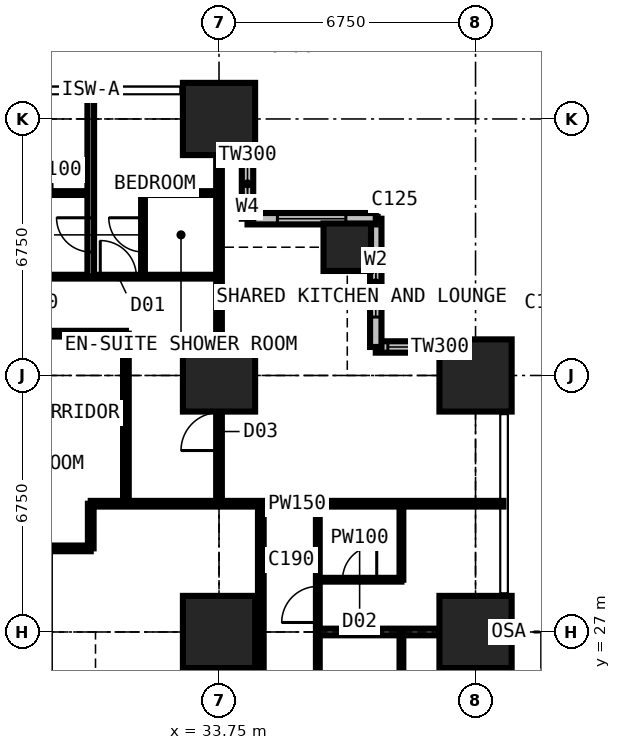
"""IFC4 building model, lengths in metres.
Left out: names, types, materials, properties, quantities, classifications, styles, units other than length and angle.
Written with IfcOpenShell. Run it as: python <this file> out.ifc"""

import sys

from ifc_helpers import new_model, si_unit, direction, frame, frame_2d, origin, origin_2d, place, context, subcontext, project, spatial, rectangle, extrude, element, fill, save


model = new_model("IFC4")
c1 = context("Model", 3, precision=1e-05, world=origin(), true_north=direction((0.0, 1.0)))
c2 = subcontext(c1, "Body", "Model", "MODEL_VIEW")
j1 = project(units=[si_unit("LENGTHUNIT", "METRE"), si_unit("PLANEANGLEUNIT", "RADIAN")], contexts=[c1])
p1 = place(None, origin())
s1 = spatial("IfcSite", under=j1, at=p1, CompositionType="ELEMENT")
p2 = place(p1, origin())
s2 = spatial("IfcBuilding", under=s1, at=p2, CompositionType="ELEMENT")
p3 = place(p2, frame((0.0, 0.0, 32.4)))
s3 = spatial("IfcBuildingStorey", under=s2, at=p3, CompositionType="ELEMENT", Elevation=32.4)
for number, where, z_axis, x_axis in (
    (1, (33.75, 27.0, 0.0), (0.0, 0.0, 1.0), (1.0, 0.0, 0.0)),
    (2, (33.75, 33.75, 0.0), (0.0, 0.0, 1.0), (1.0, 0.0, 0.0)),
    (3, (33.75, 40.5, 0.0), (0.0, 0.0, 1.0), (1.0, 0.0, 0.0)),
):
    element("IfcColumn", number, at=place(p3, frame(where, z_axis=z_axis, x_axis=x_axis)), inside=s3, PredefinedType="COLUMN", context=c2, shape_type="SweptSolid", body=[
        extrude(rectangle(XDim=1.9, YDim=1.9, at=origin_2d()), origin(), (0.0, 0.0, 1.0), 3.6),
    ])
p4 = place(p3, frame((37.125, 37.125, 0.0), z_axis=(0.0, 0.0, 1.0), x_axis=(1.0, 0.0, 0.0)))
e4 = element("IfcColumn", 4, at=p4, inside=s3, PredefinedType="COLUMN", context=c2, shape_type="SweptSolid", body=[
    extrude(rectangle(XDim=1.25, YDim=1.25, at=origin_2d()), origin(), (0.0, 0.0, 1.0), 3.6),
])
for number, where, z_axis, x_axis in (
    (5, (40.5, 27.0, 0.0), (0.0, 0.0, 1.0), (1.0, 0.0, 0.0)),
    (6, (40.5, 33.75, 0.0), (0.0, 0.0, 1.0), (1.0, 0.0, 0.0)),
):
    element("IfcColumn", number, at=place(p3, frame(where, z_axis=z_axis, x_axis=x_axis)), inside=s3, PredefinedType="COLUMN", context=c2, shape_type="SweptSolid", body=[
        extrude(rectangle(XDim=1.9, YDim=1.9, at=origin_2d()), origin(), (0.0, 0.0, 1.0), 3.6),
    ])
p5 = place(p3, frame((41.25, 34.5, 0.0), z_axis=(0.0, 0.0, 1.0), x_axis=(-1.0, 0.0, 0.0)))
e7 = element("IfcWall", 7, at=p5, inside=s3, PredefinedType="SOLIDWALL", context=c2, shape_type="SweptSolid", body=[
    extrude(rectangle(XDim=3.375, YDim=0.3, at=frame_2d((1.688, 0.0))), origin(), (0.0, 0.0, 1.0), 3.375),
])
p6 = place(p5, frame((1.857, 0.0, 0.9)))
e8 = element("IfcOpeningElement", 8, at=p6, cuts=e7, PredefinedType="OPENING", context=c2, shape_type="SweptSolid", body=[
    extrude(rectangle(XDim=1.2, YDim=1.8, at=frame_2d((0.6, 0.9))), frame((0.0, 0.16, 0.0), z_axis=(0.0, -1.0, 0.0), x_axis=(1.0, 0.0, 0.0)), (0.0, 0.0, 1.0), 0.32),
])
p7 = place(p3, frame((37.875, 34.5, 0.0), z_axis=(0.0, 0.0, 1.0), x_axis=(0.0, 1.0, 0.0)))
e9 = element("IfcWall", 9, at=p7, inside=s3, PredefinedType="SOLIDWALL", context=c2, shape_type="SweptSolid", body=[
    extrude(rectangle(XDim=3.375, YDim=0.3, at=frame_2d((1.688, 0.0))), origin(), (0.0, 0.0, 1.0), 3.375),
])
p8 = place(p7, frame((0.788, 0.0, 0.6)))
e10 = element("IfcOpeningElement", 10, at=p8, cuts=e9, PredefinedType="OPENING", context=c2, shape_type="SweptSolid", body=[
    extrude(rectangle(XDim=1.8, YDim=2.1, at=frame_2d((0.9, 1.05))), frame((0.0, 0.16, 0.0), z_axis=(0.0, -1.0, 0.0), x_axis=(1.0, 0.0, 0.0)), (0.0, 0.0, 1.0), 0.32),
])
p9 = place(p3, frame((37.875, 37.875, 0.0), z_axis=(0.0, 0.0, 1.0), x_axis=(-1.0, 0.0, 0.0)))
e11 = element("IfcWall", 11, at=p9, inside=s3, PredefinedType="SOLIDWALL", context=c2, shape_type="SweptSolid", body=[
    extrude(rectangle(XDim=3.375, YDim=0.3, at=frame_2d((1.688, 0.0))), origin(), (0.0, 0.0, 1.0), 3.375),
])
p10 = place(p9, frame((0.788, 0.0, 0.6)))
e12 = element("IfcOpeningElement", 12, at=p10, cuts=e11, PredefinedType="OPENING", context=c2, shape_type="SweptSolid", body=[
    extrude(rectangle(XDim=1.8, YDim=2.1, at=frame_2d((0.9, 1.05))), frame((0.0, 0.16, 0.0), z_axis=(0.0, -1.0, 0.0), x_axis=(1.0, 0.0, 0.0)), (0.0, 0.0, 1.0), 0.32),
])
p11 = place(p3, frame((34.5, 37.875, 0.0), z_axis=(0.0, 0.0, 1.0), x_axis=(0.0, 1.0, 0.0)))
e13 = element("IfcWall", 13, at=p11, inside=s3, PredefinedType="SOLIDWALL", context=c2, shape_type="SweptSolid", body=[
    extrude(rectangle(XDim=3.375, YDim=0.3, at=frame_2d((1.688, 0.0))), origin(), (0.0, 0.0, 1.0), 3.375),
])
p12 = place(p11, frame((0.317, 0.0, 0.9)))
e14 = element("IfcOpeningElement", 14, at=p12, cuts=e13, PredefinedType="OPENING", context=c2, shape_type="SweptSolid", body=[
    extrude(rectangle(XDim=1.2, YDim=1.8, at=frame_2d((0.6, 0.9))), frame((0.0, 0.16, 0.0), z_axis=(0.0, -1.0, 0.0), x_axis=(1.0, 0.0, 0.0)), (0.0, 0.0, 1.0), 0.32),
])
p13 = place(p3, frame((10.125, 36.35, 0.0), z_axis=(0.0, 0.0, 1.0), x_axis=(1.0, 0.0, 0.0)))
e15 = element("IfcWall", 15, at=p13, inside=s3, PredefinedType="PARTITIONING", context=c2, shape_type="SweptSolid", body=[
    extrude(rectangle(XDim=23.625, YDim=0.1, at=frame_2d((11.812, 0.0))), origin(), (0.0, 0.0, 1.0), 3.375),
])
p14 = place(p13, frame((20.5, 0.0, 0.0)))
e16 = element("IfcOpeningElement", 16, at=p14, cuts=e15, PredefinedType="OPENING", context=c2, shape_type="SweptSolid", body=[
    extrude(rectangle(XDim=0.95, YDim=2.2, at=frame_2d((0.475, 1.1))), frame((0.0, 0.06, 0.0), z_axis=(0.0, -1.0, 0.0), x_axis=(1.0, 0.0, 0.0)), (0.0, 0.0, 1.0), 0.12),
])
p15 = place(p13, frame((17.125, 0.0, 0.0)))
e17 = element("IfcOpeningElement", 17, at=p15, cuts=e15, PredefinedType="OPENING", context=c2, shape_type="SweptSolid", body=[
    extrude(rectangle(XDim=0.95, YDim=2.2, at=frame_2d((0.475, 1.1))), frame((0.0, 0.06, 0.0), z_axis=(0.0, -1.0, 0.0), x_axis=(1.0, 0.0, 0.0)), (0.0, 0.0, 1.0), 0.12),
])
p16 = place(p13, frame((13.7, 0.0, 0.0)))
e18 = element("IfcOpeningElement", 18, at=p16, cuts=e15, PredefinedType="OPENING", context=c2, shape_type="SweptSolid", body=[
    extrude(rectangle(XDim=0.95, YDim=2.2, at=frame_2d((0.475, 1.1))), frame((0.0, 0.06, 0.0), z_axis=(0.0, -1.0, 0.0), x_axis=(1.0, 0.0, 0.0)), (0.0, 0.0, 1.0), 0.12),
])
p17 = place(p13, frame((0.2, 0.0, 0.0)))
e19 = element("IfcOpeningElement", 19, at=p17, cuts=e15, PredefinedType="OPENING", context=c2, shape_type="SweptSolid", body=[
    extrude(rectangle(XDim=0.95, YDim=2.2, at=frame_2d((0.475, 1.1))), frame((0.0, 0.06, 0.0), z_axis=(0.0, -1.0, 0.0), x_axis=(1.0, 0.0, 0.0)), (0.0, 0.0, 1.0), 0.12),
])
p18 = place(p13, frame((3.625, 0.0, 0.0)))
e20 = element("IfcOpeningElement", 20, at=p18, cuts=e15, PredefinedType="OPENING", context=c2, shape_type="SweptSolid", body=[
    extrude(rectangle(XDim=0.95, YDim=2.2, at=frame_2d((0.475, 1.1))), frame((0.0, 0.06, 0.0), z_axis=(0.0, -1.0, 0.0), x_axis=(1.0, 0.0, 0.0)), (0.0, 0.0, 1.0), 0.12),
])
p19 = place(p13, frame((7.0, 0.0, 0.0)))
e21 = element("IfcOpeningElement", 21, at=p19, cuts=e15, PredefinedType="OPENING", context=c2, shape_type="SweptSolid", body=[
    extrude(rectangle(XDim=0.95, YDim=2.2, at=frame_2d((0.475, 1.1))), frame((0.0, 0.06, 0.0), z_axis=(0.0, -1.0, 0.0), x_axis=(1.0, 0.0, 0.0)), (0.0, 0.0, 1.0), 0.12),
])
p20 = place(p13, frame((10.375, 0.0, 0.0)))
e22 = element("IfcOpeningElement", 22, at=p20, cuts=e15, PredefinedType="OPENING", context=c2, shape_type="SweptSolid", body=[
    extrude(rectangle(XDim=0.95, YDim=2.2, at=frame_2d((0.475, 1.1))), frame((0.0, 0.06, 0.0), z_axis=(0.0, -1.0, 0.0), x_axis=(1.0, 0.0, 0.0)), (0.0, 0.0, 1.0), 0.12),
])
p21 = place(p3, frame((11.3, 29.2, 0.0), z_axis=(0.0, 0.0, 1.0), x_axis=(1.0, 0.0, 0.0)))
e23 = element("IfcWall", 23, at=p21, inside=s3, PredefinedType="PARTITIONING", context=c2, shape_type="SweptSolid", body=[
    extrude(rectangle(XDim=19.075, YDim=0.15, at=frame_2d((9.538, 0.0))), origin(), (0.0, 0.0, 1.0), 3.375),
])
p22 = place(p21, frame((12.875, 0.0, 0.0)))
e24 = element("IfcOpeningElement", 24, at=p22, cuts=e23, PredefinedType="OPENING", context=c2, shape_type="SweptSolid", body=[
    extrude(rectangle(XDim=1.0, YDim=2.2, at=frame_2d((0.5, 1.1))), frame((0.0, 0.085, 0.0), z_axis=(0.0, -1.0, 0.0), x_axis=(1.0, 0.0, 0.0)), (0.0, 0.0, 1.0), 0.17),
])
p23 = place(p21, frame((10.438, 0.0, 0.0)))
e25 = element("IfcOpeningElement", 25, at=p23, cuts=e23, PredefinedType="OPENING", context=c2, shape_type="SweptSolid", body=[
    extrude(rectangle(XDim=1.0, YDim=2.2, at=frame_2d((0.5, 1.1))), frame((0.0, 0.085, 0.0), z_axis=(0.0, -1.0, 0.0), x_axis=(1.0, 0.0, 0.0)), (0.0, 0.0, 1.0), 0.17),
])
p24 = place(p21, frame((15.675, 0.0, 0.0)))
e26 = element("IfcOpeningElement", 26, at=p24, cuts=e23, PredefinedType="OPENING", context=c2, shape_type="SweptSolid", body=[
    extrude(rectangle(XDim=0.95, YDim=2.2, at=frame_2d((0.475, 1.1))), frame((0.0, 0.085, 0.0), z_axis=(0.0, -1.0, 0.0), x_axis=(1.0, 0.0, 0.0)), (0.0, 0.0, 1.0), 0.17),
])
p25 = place(p3, frame((25.725, 34.85, 0.0), z_axis=(0.0, 0.0, 1.0), x_axis=(1.0, 0.0, 0.0)))
e27 = element("IfcWall", 27, at=p25, inside=s3, PredefinedType="PARTITIONING", context=c2, shape_type="SweptSolid", body=[
    extrude(rectangle(XDim=5.575, YDim=0.15, at=frame_2d((2.788, 0.0))), origin(), (0.0, 0.0, 1.0), 3.375),
])
p26 = place(p3, frame((28.375, 38.55, 0.0), z_axis=(0.0, 0.0, 1.0), x_axis=(1.0, 0.0, 0.0)))
e28 = element("IfcWall", 28, at=p26, inside=s3, PredefinedType="PARTITIONING", context=c2, shape_type="SweptSolid", body=[
    extrude(rectangle(XDim=2.0, YDim=0.1, at=frame_2d((1.0, 0.0))), origin(), (0.0, 0.0, 1.0), 3.375),
])
p27 = place(p3, frame((30.375, 29.2, 0.0), z_axis=(0.0, 0.0, 1.0), x_axis=(0.0, 1.0, 0.0)))
e29 = element("IfcWall", 29, at=p27, inside=s3, PredefinedType="PARTITIONING", context=c2, shape_type="SweptSolid", body=[
    extrude(rectangle(XDim=1.175, YDim=0.15, at=frame_2d((0.587, 0.0))), origin(), (0.0, 0.0, 1.0), 3.375),
])
p28 = place(p3, frame((30.375, 30.375, 0.0), z_axis=(0.0, 0.0, 1.0), x_axis=(1.0, 0.0, 0.0)))
e30 = element("IfcWall", 30, at=p28, inside=s3, PredefinedType="PARTITIONING", context=c2, shape_type="SweptSolid", body=[
    extrude(rectangle(XDim=10.859, YDim=0.15, at=frame_2d((5.429, 0.0))), origin(), (0.0, 0.0, 1.0), 3.375),
])
p29 = place(p3, frame((30.375, 36.35, 0.0), z_axis=(0.0, 0.0, 1.0), x_axis=(0.0, 1.0, 0.0)))
e31 = element("IfcWall", 31, at=p29, inside=s3, PredefinedType="PARTITIONING", context=c2, shape_type="SweptSolid", body=[
    extrude(rectangle(XDim=4.884, YDim=0.175, at=frame_2d((2.442, 0.0))), origin(), (0.0, 0.0, 1.0), 3.375),
])
p30 = place(p29, frame((0.65, 0.0, 0.0)))
e32 = element("IfcOpeningElement", 32, at=p30, cuts=e31, PredefinedType="OPENING", context=c2, shape_type="SweptSolid", body=[
    extrude(rectangle(XDim=0.9, YDim=2.2, at=frame_2d((0.45, 1.1))), frame((0.0, 0.097, 0.0), z_axis=(0.0, -1.0, 0.0), x_axis=(1.0, 0.0, 0.0)), (0.0, 0.0, 1.0), 0.195),
])
p31 = place(p3, frame((31.3, 30.375, 0.0), z_axis=(0.0, 0.0, 1.0), x_axis=(0.0, 1.0, 0.0)))
e33 = element("IfcWall", 33, at=p31, inside=s3, PredefinedType="PARTITIONING", context=c2, shape_type="SweptSolid", body=[
    extrude(rectangle(XDim=4.475, YDim=0.15, at=frame_2d((2.238, 0.0))), origin(), (0.0, 0.0, 1.0), 3.375),
])
p32 = place(p3, frame((31.75, 36.35, 0.0), z_axis=(0.0, 0.0, 1.0), x_axis=(0.0, 1.0, 0.0)))
e34 = element("IfcWall", 34, at=p32, inside=s3, PredefinedType="PARTITIONING", context=c2, shape_type="SweptSolid", body=[
    extrude(rectangle(XDim=2.2, YDim=0.1, at=frame_2d((1.1, 0.0))), origin(), (0.0, 0.0, 1.0), 3.375),
])
p33 = place(p32, frame((0.65, 0.0, 0.0)))
e35 = element("IfcOpeningElement", 35, at=p33, cuts=e34, PredefinedType="OPENING", context=c2, shape_type="SweptSolid", body=[
    extrude(rectangle(XDim=0.9, YDim=2.2, at=frame_2d((0.45, 1.1))), frame((0.0, 0.06, 0.0), z_axis=(0.0, -1.0, 0.0), x_axis=(1.0, 0.0, 0.0)), (0.0, 0.0, 1.0), 0.12),
])
p34 = place(p3, frame((31.75, 38.55, 0.0), z_axis=(0.0, 0.0, 1.0), x_axis=(1.0, 0.0, 0.0)))
e36 = element("IfcWall", 36, at=p34, inside=s3, PredefinedType="PARTITIONING", context=c2, shape_type="SweptSolid", body=[
    extrude(rectangle(XDim=2.0, YDim=0.1, at=frame_2d((1.0, 0.0))), origin(), (0.0, 0.0, 1.0), 3.375),
])
p35 = place(p3, frame((33.75, 30.375, 0.0), z_axis=(0.0, 0.0, 1.0), x_axis=(0.0, 1.0, 0.0)))
e37 = element("IfcWall", 37, at=p35, inside=s3, PredefinedType="PARTITIONING", context=c2, shape_type="SweptSolid", body=[
    extrude(rectangle(XDim=10.859, YDim=0.15, at=frame_2d((5.429, 0.0))), origin(), (0.0, 0.0, 1.0), 2.877),
])
p36 = place(p35, frame((1.4, 0.0, 0.0)))
e38 = element("IfcOpeningElement", 38, at=p36, cuts=e37, PredefinedType="OPENING", context=c2, shape_type="SweptSolid", body=[
    extrude(rectangle(XDim=1.0, YDim=2.2, at=frame_2d((0.5, 1.1))), frame((0.0, 0.085, 0.0), z_axis=(0.0, -1.0, 0.0), x_axis=(1.0, 0.0, 0.0)), (0.0, 0.0, 1.0), 0.17),
])
p37 = place(p3, frame((34.85, 12.55, 0.0), z_axis=(0.0, 0.0, 1.0), x_axis=(0.0, 1.0, 0.0)))
e39 = element("IfcWall", 39, at=p37, inside=s3, PredefinedType="PARTITIONING", context=c2, shape_type="SweptSolid", body=[
    extrude(rectangle(XDim=17.825, YDim=0.15, at=frame_2d((8.913, 0.0))), origin(), (0.0, 0.0, 1.0), 3.375),
])
p38 = place(p37, frame((8.65, 0.0, 0.0)))
e40 = element("IfcOpeningElement", 40, at=p38, cuts=e39, PredefinedType="OPENING", context=c2, shape_type="SweptSolid", body=[
    extrude(rectangle(XDim=0.95, YDim=2.2, at=frame_2d((0.475, 1.1))), frame((0.0, 0.085, 0.0), z_axis=(0.0, -1.0, 0.0), x_axis=(1.0, 0.0, 0.0)), (0.0, 0.0, 1.0), 0.17),
])
p39 = place(p3, frame((36.35, 6.75, 0.0), z_axis=(0.0, 0.0, 1.0), x_axis=(0.0, 1.0, 0.0)))
e41 = element("IfcWall", 41, at=p39, inside=s3, PredefinedType="PARTITIONING", context=c2, shape_type="SweptSolid", body=[
    extrude(rectangle(XDim=23.625, YDim=0.1, at=frame_2d((11.812, 0.0))), origin(), (0.0, 0.0, 1.0), 3.375),
])
p40 = place(p39, frame((0.2, 0.0, 0.0)))
e42 = element("IfcOpeningElement", 42, at=p40, cuts=e41, PredefinedType="OPENING", context=c2, shape_type="SweptSolid", body=[
    extrude(rectangle(XDim=0.95, YDim=2.2, at=frame_2d((0.475, 1.1))), frame((0.0, 0.06, 0.0), z_axis=(0.0, -1.0, 0.0), x_axis=(1.0, 0.0, 0.0)), (0.0, 0.0, 1.0), 0.12),
])
p41 = place(p39, frame((3.575, 0.0, 0.0)))
e43 = element("IfcOpeningElement", 43, at=p41, cuts=e41, PredefinedType="OPENING", context=c2, shape_type="SweptSolid", body=[
    extrude(rectangle(XDim=0.95, YDim=2.2, at=frame_2d((0.475, 1.1))), frame((0.0, 0.06, 0.0), z_axis=(0.0, -1.0, 0.0), x_axis=(1.0, 0.0, 0.0)), (0.0, 0.0, 1.0), 0.12),
])
p42 = place(p39, frame((7.0, 0.0, 0.0)))
e44 = element("IfcOpeningElement", 44, at=p42, cuts=e41, PredefinedType="OPENING", context=c2, shape_type="SweptSolid", body=[
    extrude(rectangle(XDim=0.95, YDim=2.2, at=frame_2d((0.475, 1.1))), frame((0.0, 0.06, 0.0), z_axis=(0.0, -1.0, 0.0), x_axis=(1.0, 0.0, 0.0)), (0.0, 0.0, 1.0), 0.12),
])
p43 = place(p39, frame((10.375, 0.0, 0.0)))
e45 = element("IfcOpeningElement", 45, at=p43, cuts=e41, PredefinedType="OPENING", context=c2, shape_type="SweptSolid", body=[
    extrude(rectangle(XDim=0.95, YDim=2.2, at=frame_2d((0.475, 1.1))), frame((0.0, 0.06, 0.0), z_axis=(0.0, -1.0, 0.0), x_axis=(1.0, 0.0, 0.0)), (0.0, 0.0, 1.0), 0.12),
])
p44 = place(p39, frame((13.75, 0.0, 0.0)))
e46 = element("IfcOpeningElement", 46, at=p44, cuts=e41, PredefinedType="OPENING", context=c2, shape_type="SweptSolid", body=[
    extrude(rectangle(XDim=0.95, YDim=2.2, at=frame_2d((0.475, 1.1))), frame((0.0, 0.06, 0.0), z_axis=(0.0, -1.0, 0.0), x_axis=(1.0, 0.0, 0.0)), (0.0, 0.0, 1.0), 0.12),
])
p45 = place(p39, frame((17.125, 0.0, 0.0)))
e47 = element("IfcOpeningElement", 47, at=p45, cuts=e41, PredefinedType="OPENING", context=c2, shape_type="SweptSolid", body=[
    extrude(rectangle(XDim=0.95, YDim=2.2, at=frame_2d((0.475, 1.1))), frame((0.0, 0.06, 0.0), z_axis=(0.0, -1.0, 0.0), x_axis=(1.0, 0.0, 0.0)), (0.0, 0.0, 1.0), 0.12),
])
p46 = place(p39, frame((20.5, 0.0, 0.0)))
e48 = element("IfcOpeningElement", 48, at=p46, cuts=e41, PredefinedType="OPENING", context=c2, shape_type="SweptSolid", body=[
    extrude(rectangle(XDim=0.95, YDim=2.2, at=frame_2d((0.475, 1.1))), frame((0.0, 0.06, 0.0), z_axis=(0.0, -1.0, 0.0), x_axis=(1.0, 0.0, 0.0)), (0.0, 0.0, 1.0), 0.12),
])
p47 = place(p3, frame((36.35, 27.0, 0.0), z_axis=(0.0, 0.0, 1.0), x_axis=(1.0, 0.0, 0.0)))
e49 = element("IfcWall", 49, at=p47, inside=s3, PredefinedType="PARTITIONING", context=c2, shape_type="SweptSolid", body=[
    extrude(rectangle(XDim=4.884, YDim=0.175, at=frame_2d((2.442, 0.0))), origin(), (0.0, 0.0, 1.0), 2.61),
])
p48 = place(p3, frame((36.35, 28.375, 0.0), z_axis=(0.0, 0.0, 1.0), x_axis=(1.0, 0.0, 0.0)))
e50 = element("IfcWall", 50, at=p48, inside=s3, PredefinedType="PARTITIONING", context=c2, shape_type="SweptSolid", body=[
    extrude(rectangle(XDim=2.2, YDim=0.1, at=frame_2d((1.1, 0.0))), origin(), (0.0, 0.0, 1.0), 3.375),
])
p49 = place(p48, frame((0.65, 0.0, 0.0)))
e51 = element("IfcOpeningElement", 51, at=p49, cuts=e50, PredefinedType="OPENING", context=c2, shape_type="SweptSolid", body=[
    extrude(rectangle(XDim=0.9, YDim=2.2, at=frame_2d((0.45, 1.1))), frame((0.0, 0.06, 0.0), z_axis=(0.0, -1.0, 0.0), x_axis=(1.0, 0.0, 0.0)), (0.0, 0.0, 1.0), 0.12),
])
for number, where, z_axis, x_axis in (
    (52, (38.55, 25.0, 0.0), (0.0, 0.0, 1.0), (0.0, 1.0, 0.0)),
    (53, (38.55, 28.375, 0.0), (0.0, 0.0, 1.0), (0.0, 1.0, 0.0)),
):
    element("IfcWall", number, at=place(p3, frame(where, z_axis=z_axis, x_axis=x_axis)), inside=s3, PredefinedType="PARTITIONING", context=c2, shape_type="SweptSolid", body=[
        extrude(rectangle(XDim=2.0, YDim=0.1, at=frame_2d((1.0, 0.0))), origin(), (0.0, 0.0, 1.0), 3.375),
    ])
p50 = place(p6, origin())
e54 = element("IfcWindow", 54, at=p50, inside=s3, PartitioningType="SINGLE_PANEL", PredefinedType="WINDOW", context=c2, shape_type="SweptSolid", body=[
    extrude(rectangle(XDim=1.2, YDim=1.8, at=frame_2d((0.6, 0.9))), frame((0.0, 0.03, 0.0), z_axis=(0.0, -1.0, 0.0), x_axis=(1.0, 0.0, 0.0)), (0.0, 0.0, 1.0), 0.06),
])
fill(e8, e54)
p51 = place(p8, origin())
e55 = element("IfcWindow", 55, at=p51, inside=s3, PartitioningType="SINGLE_PANEL", PredefinedType="WINDOW", context=c2, shape_type="SweptSolid", body=[
    extrude(rectangle(XDim=1.8, YDim=2.1, at=frame_2d((0.9, 1.05))), frame((0.0, 0.03, 0.0), z_axis=(0.0, -1.0, 0.0), x_axis=(1.0, 0.0, 0.0)), (0.0, 0.0, 1.0), 0.06),
])
fill(e10, e55)
p52 = place(p10, origin())
e56 = element("IfcWindow", 56, at=p52, inside=s3, PartitioningType="SINGLE_PANEL", PredefinedType="WINDOW", context=c2, shape_type="SweptSolid", body=[
    extrude(rectangle(XDim=1.8, YDim=2.1, at=frame_2d((0.9, 1.05))), frame((0.0, 0.03, 0.0), z_axis=(0.0, -1.0, 0.0), x_axis=(1.0, 0.0, 0.0)), (0.0, 0.0, 1.0), 0.06),
])
fill(e12, e56)
p53 = place(p12, origin())
e57 = element("IfcWindow", 57, at=p53, inside=s3, PartitioningType="SINGLE_PANEL", PredefinedType="WINDOW", context=c2, shape_type="SweptSolid", body=[
    extrude(rectangle(XDim=1.2, YDim=1.8, at=frame_2d((0.6, 0.9))), frame((0.0, 0.03, 0.0), z_axis=(0.0, -1.0, 0.0), x_axis=(1.0, 0.0, 0.0)), (0.0, 0.0, 1.0), 0.06),
])
fill(e14, e57)
p54 = place(p46, origin())
e58 = element("IfcDoor", 58, at=p54, inside=s3, OperationType="SINGLE_SWING_LEFT", PredefinedType="DOOR", context=c2, shape_type="SweptSolid", body=[
    extrude(rectangle(XDim=0.95, YDim=2.2, at=frame_2d((0.475, 1.1))), frame((0.0, 0.025, 0.0), z_axis=(0.0, -1.0, 0.0), x_axis=(1.0, 0.0, 0.0)), (0.0, 0.0, 1.0), 0.05),
])
fill(e48, e58)
p55 = place(p49, origin())
e59 = element("IfcDoor", 59, at=p55, inside=s3, OperationType="SINGLE_SWING_RIGHT", PredefinedType="DOOR", context=c2, shape_type="SweptSolid", body=[
    extrude(rectangle(XDim=0.9, YDim=2.2, at=frame_2d((0.45, 1.1))), frame((0.0, 0.025, 0.0), z_axis=(0.0, -1.0, 0.0), x_axis=(1.0, 0.0, 0.0)), (0.0, 0.0, 1.0), 0.05),
])
fill(e51, e59)
p56 = place(p36, origin())
e60 = element("IfcDoor", 60, at=p56, inside=s3, OperationType="SINGLE_SWING_LEFT", PredefinedType="DOOR", context=c2, shape_type="SweptSolid", body=[
    extrude(rectangle(XDim=1.0, YDim=2.2, at=frame_2d((0.5, 1.1))), frame((0.0, 0.025, 0.0), z_axis=(0.0, -1.0, 0.0), x_axis=(1.0, 0.0, 0.0)), (0.0, 0.0, 1.0), 0.05),
])
fill(e38, e60)
p57 = place(p14, origin())
e61 = element("IfcDoor", 61, at=p57, inside=s3, OperationType="SINGLE_SWING_LEFT", PredefinedType="DOOR", context=c2, shape_type="SweptSolid", body=[
    extrude(rectangle(XDim=0.95, YDim=2.2, at=frame_2d((0.475, 1.1))), frame((0.0, 0.025, 0.0), z_axis=(0.0, -1.0, 0.0), x_axis=(1.0, 0.0, 0.0)), (0.0, 0.0, 1.0), 0.05),
])
fill(e16, e61)
p58 = place(p33, origin())
e62 = element("IfcDoor", 62, at=p58, inside=s3, OperationType="SINGLE_SWING_RIGHT", PredefinedType="DOOR", context=c2, shape_type="SweptSolid", body=[
    extrude(rectangle(XDim=0.9, YDim=2.2, at=frame_2d((0.45, 1.1))), frame((0.0, 0.025, 0.0), z_axis=(0.0, -1.0, 0.0), x_axis=(1.0, 0.0, 0.0)), (0.0, 0.0, 1.0), 0.05),
])
fill(e35, e62)
p59 = place(p30, origin())
e63 = element("IfcDoor", 63, at=p59, inside=s3, OperationType="SINGLE_SWING_RIGHT", PredefinedType="DOOR", context=c2, shape_type="SweptSolid", body=[
    extrude(rectangle(XDim=0.9, YDim=2.2, at=frame_2d((0.45, 1.1))), frame((0.0, 0.025, 0.0), z_axis=(0.0, -1.0, 0.0), x_axis=(1.0, 0.0, 0.0)), (0.0, 0.0, 1.0), 0.05),
])
fill(e32, e63)
save(model, sys.argv[1])
